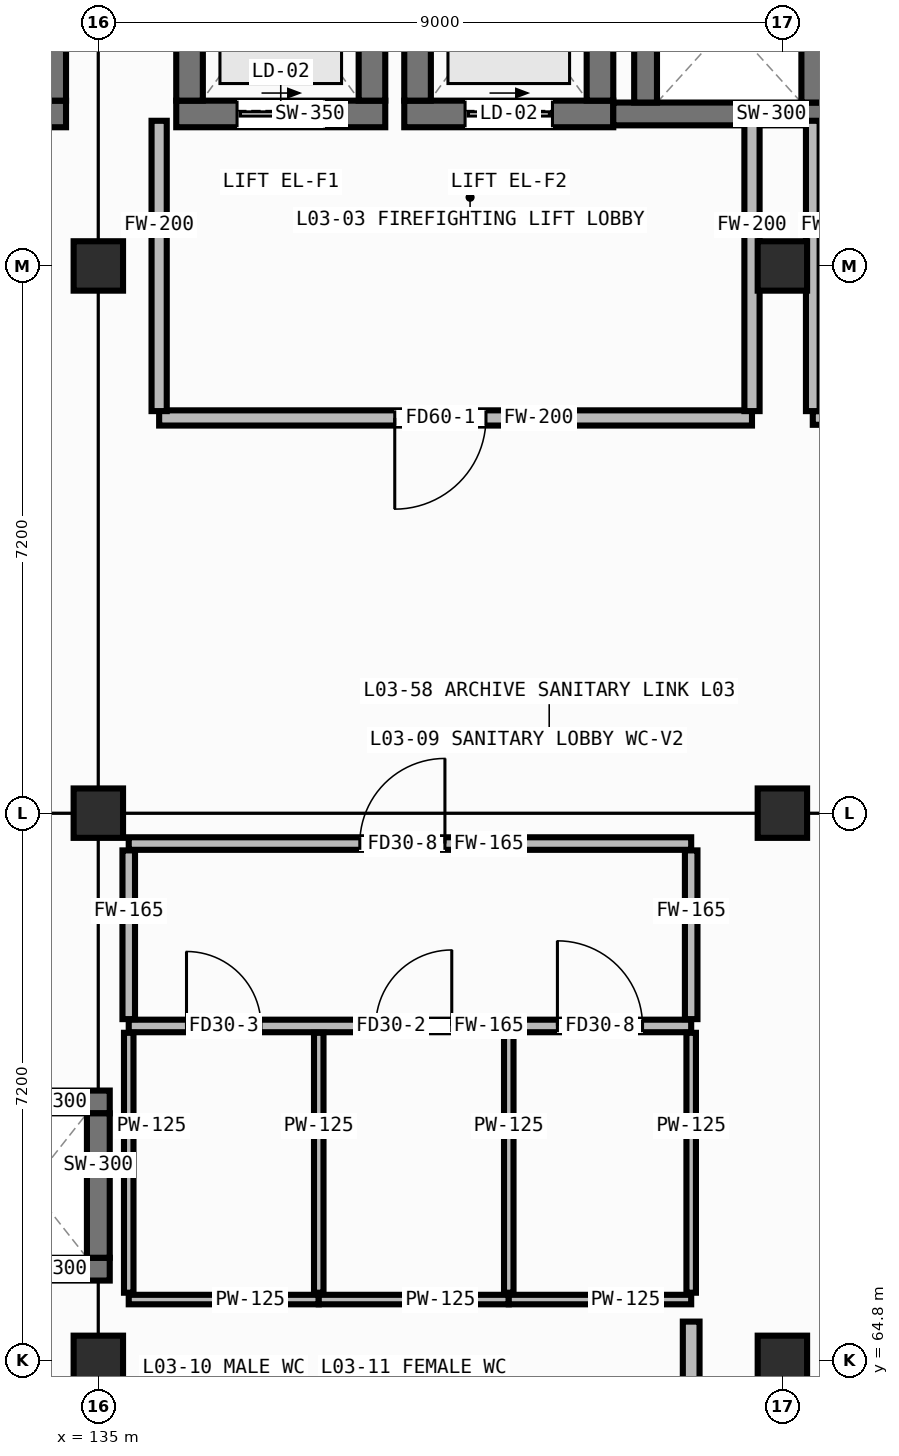
"""IFC4 building model, lengths in metres.
Left out: names, types, materials, properties, quantities, classifications, styles, units other than length and angle.
Written with IfcOpenShell. Run it as: python <this file> out.ifc"""

import sys

from ifc_helpers import new_model, si_unit, direction, frame, frame_2d, origin, origin_2d, place, context, subcontext, project, spatial, rectangle, hollow_rectangle, extrude, element, fill, save


model = new_model("IFC4")
c1 = context("Model", 3, precision=1e-05, world=origin(), true_north=direction((0.0, 1.0)))
c2 = subcontext(c1, "Body", "Model", "MODEL_VIEW")
j1 = project(units=[si_unit("LENGTHUNIT", "METRE"), si_unit("PLANEANGLEUNIT", "RADIAN")], contexts=[c1])
p1 = place(None, origin())
s1 = spatial("IfcSite", under=j1, at=p1, CompositionType="ELEMENT")
p2 = place(p1, origin())
s2 = spatial("IfcBuilding", under=s1, at=p2, CompositionType="ELEMENT")
p3 = place(p2, frame((0.0, 0.0, 8.8)))
s3 = spatial("IfcBuildingStorey", under=s2, at=p3, CompositionType="ELEMENT", Elevation=8.8)
for number, where, z_axis, x_axis in (
    (1, (135.0, 64.8, 0.0), (0.0, 0.0, 1.0), (1.0, 0.0, 0.0)),
    (2, (135.0, 72.0, 0.0), (0.0, 0.0, 1.0), (1.0, 0.0, 0.0)),
    (3, (135.0, 79.2, 0.0), (0.0, 0.0, 1.0), (1.0, 0.0, 0.0)),
    (4, (144.0, 64.8, 0.0), (0.0, 0.0, 1.0), (1.0, 0.0, 0.0)),
    (5, (144.0, 72.0, 0.0), (0.0, 0.0, 1.0), (1.0, 0.0, 0.0)),
    (6, (144.0, 79.2, 0.0), (0.0, 0.0, 1.0), (1.0, 0.0, 0.0)),
):
    element("IfcColumn", number, at=place(p3, frame(where, z_axis=z_axis, x_axis=x_axis)), inside=s3, PredefinedType="COLUMN", context=c2, shape_type="SweptSolid", body=[
        extrude(hollow_rectangle(XDim=0.65, YDim=0.65, WallThickness=0.025, at=origin_2d()), origin(), (0.0, 0.0, 1.0), 4.0),
    ])
p4 = place(p3, frame((126.425, 81.2, 0.0), z_axis=(0.0, 0.0, 1.0), x_axis=(1.0, 0.0, 0.0)))
e7 = element("IfcWall", 7, at=p4, inside=s3, PredefinedType="SHEAR", context=c2, shape_type="SweptSolid", body=[
    extrude(rectangle(XDim=8.15, YDim=0.35, at=frame_2d((4.075, 0.0))), origin(), (0.0, 0.0, 1.0), 3.745),
])
p5 = place(p4, frame((0.525, 0.0, 0.0)))
e8 = element("IfcOpeningElement", 8, at=p5, cuts=e7, PredefinedType="OPENING", context=c2, shape_type="SweptSolid", body=[
    extrude(rectangle(XDim=1.15, YDim=2.1, at=frame_2d((0.575, 1.05))), frame((0.0, 0.187, 0.0), z_axis=(0.0, -1.0, 0.0), x_axis=(1.0, 0.0, 0.0)), (0.0, 0.0, 1.0), 0.374),
])
p6 = place(p3, frame((134.4, 81.375, 0.0), z_axis=(0.0, 0.0, 1.0), x_axis=(0.0, 1.0, 0.0)))
e9 = element("IfcWall", 9, at=p6, inside=s3, PredefinedType="SHEAR", context=c2, shape_type="SweptSolid", body=[
    extrude(rectangle(XDim=3.55, YDim=0.35, at=frame_2d((1.775, 0.0))), origin(), (0.0, 0.0, 1.0), 3.745),
])
p7 = place(p3, frame((136.025, 81.2, 0.0), z_axis=(0.0, 0.0, 1.0), x_axis=(1.0, 0.0, 0.0)))
e10 = element("IfcWall", 10, at=p7, inside=s3, PredefinedType="SHEAR", context=c2, shape_type="SweptSolid", body=[
    extrude(rectangle(XDim=2.75, YDim=0.35, at=frame_2d((1.375, 0.0))), origin(), (0.0, 0.0, 1.0), 3.745),
])
p8 = place(p7, frame((0.8, 0.0, 0.0)))
e11 = element("IfcOpeningElement", 11, at=p8, cuts=e10, PredefinedType="OPENING", context=c2, shape_type="SweptSolid", body=[
    extrude(rectangle(XDim=1.15, YDim=2.12, at=frame_2d((0.575, 1.06))), frame((0.0, 0.187, 0.0), z_axis=(0.0, -1.0, 0.0), x_axis=(1.0, 0.0, 0.0)), (0.0, 0.0, 1.0), 0.374),
])
for number, where, z_axis, x_axis in (
    (12, (136.2, 81.375, 0.0), (0.0, 0.0, 1.0), (0.0, 1.0, 0.0)),
    (13, (138.6, 81.375, 0.0), (0.0, 0.0, 1.0), (0.0, 1.0, 0.0)),
):
    element("IfcWall", number, at=place(p3, frame(where, z_axis=z_axis, x_axis=x_axis)), inside=s3, PredefinedType="SHEAR", context=c2, shape_type="SweptSolid", body=[
        extrude(rectangle(XDim=2.85, YDim=0.35, at=frame_2d((1.425, 0.0))), origin(), (0.0, 0.0, 1.0), 3.745),
    ])
p9 = place(p3, frame((139.025, 81.2, 0.0), z_axis=(0.0, 0.0, 1.0), x_axis=(1.0, 0.0, 0.0)))
e14 = element("IfcWall", 14, at=p9, inside=s3, PredefinedType="SHEAR", context=c2, shape_type="SweptSolid", body=[
    extrude(rectangle(XDim=2.75, YDim=0.35, at=frame_2d((1.375, 0.0))), origin(), (0.0, 0.0, 1.0), 3.745),
])
p10 = place(p9, frame((0.8, 0.0, 0.0)))
e15 = element("IfcOpeningElement", 15, at=p10, cuts=e14, PredefinedType="OPENING", context=c2, shape_type="SweptSolid", body=[
    extrude(rectangle(XDim=1.15, YDim=2.12, at=frame_2d((0.575, 1.06))), frame((0.0, 0.187, 0.0), z_axis=(0.0, -1.0, 0.0), x_axis=(1.0, 0.0, 0.0)), (0.0, 0.0, 1.0), 0.374),
])
for number, where, z_axis, x_axis in (
    (16, (139.2, 81.375, 0.0), (0.0, 0.0, 1.0), (0.0, 1.0, 0.0)),
    (17, (141.6, 81.375, 0.0), (0.0, 0.0, 1.0), (0.0, 1.0, 0.0)),
):
    element("IfcWall", number, at=place(p3, frame(where, z_axis=z_axis, x_axis=x_axis)), inside=s3, PredefinedType="SHEAR", context=c2, shape_type="SweptSolid", body=[
        extrude(rectangle(XDim=2.85, YDim=0.35, at=frame_2d((1.425, 0.0))), origin(), (0.0, 0.0, 1.0), 3.745),
    ])
p11 = place(p3, frame((141.775, 81.2, 0.0), z_axis=(0.0, 0.0, 1.0), x_axis=(1.0, 0.0, 0.0)))
e18 = element("IfcWall", 18, at=p11, inside=s3, PredefinedType="SHEAR", context=c2, shape_type="SweptSolid", body=[
    extrude(rectangle(XDim=3.25, YDim=0.3, at=frame_2d((1.625, 0.0))), origin(), (0.0, 0.0, 1.0), 3.745),
])
for number, where, z_axis, x_axis in (
    (19, (142.2, 81.35, 0.0), (0.0, 0.0, 1.0), (0.0, 1.0, 0.0)),
    (20, (144.4, 81.35, 0.0), (0.0, 0.0, 1.0), (0.0, 1.0, 0.0)),
    (21, (133.05, 66.0, 0.0), (0.0, 0.0, 1.0), (1.0, 0.0, 0.0)),
    (22, (133.05, 68.2, 0.0), (0.0, 0.0, 1.0), (1.0, 0.0, 0.0)),
):
    element("IfcWall", number, at=place(p3, frame(where, z_axis=z_axis, x_axis=x_axis)), inside=s3, PredefinedType="SHEAR", context=c2, shape_type="SweptSolid", body=[
        extrude(rectangle(XDim=2.1, YDim=0.3, at=frame_2d((1.05, 0.0))), origin(), (0.0, 0.0, 1.0), 3.745),
    ])
p12 = place(p3, frame((135.0, 66.15, 0.0), z_axis=(0.0, 0.0, 1.0), x_axis=(0.0, 1.0, 0.0)))
e23 = element("IfcWall", 23, at=p12, inside=s3, PredefinedType="SHEAR", context=c2, shape_type="SweptSolid", body=[
    extrude(rectangle(XDim=1.9, YDim=0.3, at=frame_2d((0.95, 0.0))), origin(), (0.0, 0.0, 1.0), 3.745),
])
p13 = place(p3, frame((135.8, 77.2, 0.0), z_axis=(0.0, 0.0, 1.0), x_axis=(1.0, 0.0, 0.0)))
e24 = element("IfcWall", 24, at=p13, inside=s3, PredefinedType="PARTITIONING", context=c2, shape_type="SweptSolid", body=[
    extrude(rectangle(XDim=7.8, YDim=0.2, at=frame_2d((3.9, 0.0))), origin(), (0.0, 0.0, 1.0), 3.745),
])
p14 = place(p13, frame((3.1, 0.0, 0.0)))
e25 = element("IfcOpeningElement", 25, at=p14, cuts=e24, PredefinedType="OPENING", context=c2, shape_type="SweptSolid", body=[
    extrude(rectangle(XDim=1.2, YDim=2.1, at=frame_2d((0.6, 1.05))), frame((0.0, 0.112, 0.0), z_axis=(0.0, -1.0, 0.0), x_axis=(1.0, 0.0, 0.0)), (0.0, 0.0, 1.0), 0.224),
])
for number, where, z_axis, x_axis in (
    (26, (135.8, 77.29, 0.0), (0.0, 0.0, 1.0), (0.0, 1.0, 0.0)),
    (27, (143.6, 77.29, 0.0), (0.0, 0.0, 1.0), (0.0, 1.0, 0.0)),
):
    element("IfcWall", number, at=place(p3, frame(where, z_axis=z_axis, x_axis=x_axis)), inside=s3, PredefinedType="PARTITIONING", context=c2, shape_type="SweptSolid", body=[
        extrude(rectangle(XDim=3.82, YDim=0.2, at=frame_2d((1.91, 0.0))), origin(), (0.0, 0.0, 1.0), 3.745),
    ])
p15 = place(p3, frame((144.4, 77.2, 0.0), z_axis=(0.0, 0.0, 1.0), x_axis=(1.0, 0.0, 0.0)))
e28 = element("IfcWall", 28, at=p15, inside=s3, PredefinedType="PARTITIONING", context=c2, shape_type="SweptSolid", body=[
    extrude(rectangle(XDim=8.2, YDim=0.18, at=frame_2d((4.1, 0.0))), origin(), (0.0, 0.0, 1.0), 3.745),
])
p16 = place(p15, frame((3.54, 0.0, 0.0)))
e29 = element("IfcOpeningElement", 29, at=p16, cuts=e28, PredefinedType="OPENING", context=c2, shape_type="SweptSolid", body=[
    extrude(rectangle(XDim=1.12, YDim=2.08, at=frame_2d((0.56, 1.04))), frame((0.0, 0.102, 0.0), z_axis=(0.0, -1.0, 0.0), x_axis=(1.0, 0.0, 0.0)), (0.0, 0.0, 1.0), 0.204),
])
p17 = place(p3, frame((144.4, 77.29, 0.0), z_axis=(0.0, 0.0, 1.0), x_axis=(0.0, 1.0, 0.0)))
e30 = element("IfcWall", 30, at=p17, inside=s3, PredefinedType="PARTITIONING", context=c2, shape_type="SweptSolid", body=[
    extrude(rectangle(XDim=3.82, YDim=0.18, at=frame_2d((1.91, 0.0))), origin(), (0.0, 0.0, 1.0), 3.745),
])
p18 = place(p3, frame((135.4, 69.2, 0.0), z_axis=(0.0, 0.0, 1.0), x_axis=(1.0, 0.0, 0.0)))
e31 = element("IfcWall", 31, at=p18, inside=s3, PredefinedType="PARTITIONING", context=c2, shape_type="SweptSolid", body=[
    extrude(rectangle(XDim=7.4, YDim=0.165, at=frame_2d((3.7, 0.0))), origin(), (0.0, 0.0, 1.0), 3.745),
])
p19 = place(p18, frame((0.76, 0.0, 0.0)))
e32 = element("IfcOpeningElement", 32, at=p19, cuts=e31, PredefinedType="OPENING", context=c2, shape_type="SweptSolid", body=[
    extrude(rectangle(XDim=0.98, YDim=2.02, at=frame_2d((0.49, 1.01))), frame((0.0, 0.094, 0.0), z_axis=(0.0, -1.0, 0.0), x_axis=(1.0, 0.0, 0.0)), (0.0, 0.0, 1.0), 0.189),
])
p20 = place(p18, frame((3.25, 0.0, 0.0)))
e33 = element("IfcOpeningElement", 33, at=p20, cuts=e31, PredefinedType="OPENING", context=c2, shape_type="SweptSolid", body=[
    extrude(rectangle(XDim=1.0, YDim=2.08, at=frame_2d((0.5, 1.04))), frame((0.0, 0.094, 0.0), z_axis=(0.0, -1.0, 0.0), x_axis=(1.0, 0.0, 0.0)), (0.0, 0.0, 1.0), 0.189),
])
p21 = place(p18, frame((5.64, 0.0, 0.0)))
e34 = element("IfcOpeningElement", 34, at=p21, cuts=e31, PredefinedType="OPENING", context=c2, shape_type="SweptSolid", body=[
    extrude(rectangle(XDim=1.12, YDim=2.08, at=frame_2d((0.56, 1.04))), frame((0.0, 0.094, 0.0), z_axis=(0.0, -1.0, 0.0), x_axis=(1.0, 0.0, 0.0)), (0.0, 0.0, 1.0), 0.189),
])
p22 = place(p3, frame((135.4, 71.6, 0.0), z_axis=(0.0, 0.0, 1.0), x_axis=(1.0, 0.0, 0.0)))
e35 = element("IfcWall", 35, at=p22, inside=s3, PredefinedType="PARTITIONING", context=c2, shape_type="SweptSolid", body=[
    extrude(rectangle(XDim=7.4, YDim=0.165, at=frame_2d((3.7, 0.0))), origin(), (0.0, 0.0, 1.0), 3.745),
])
p23 = place(p22, frame((3.04, 0.0, 0.0)))
e36 = element("IfcOpeningElement", 36, at=p23, cuts=e35, PredefinedType="OPENING", context=c2, shape_type="SweptSolid", body=[
    extrude(rectangle(XDim=1.12, YDim=2.08, at=frame_2d((0.56, 1.04))), frame((0.0, 0.094, 0.0), z_axis=(0.0, -1.0, 0.0), x_axis=(1.0, 0.0, 0.0)), (0.0, 0.0, 1.0), 0.189),
])
for number, where, z_axis, x_axis in (
    (37, (135.4, 69.29, 0.0), (0.0, 0.0, 1.0), (0.0, 1.0, 0.0)),
    (38, (142.8, 69.29, 0.0), (0.0, 0.0, 1.0), (0.0, 1.0, 0.0)),
):
    element("IfcWall", number, at=place(p3, frame(where, z_axis=z_axis, x_axis=x_axis)), inside=s3, PredefinedType="PARTITIONING", context=c2, shape_type="SweptSolid", body=[
        extrude(rectangle(XDim=2.22, YDim=0.165, at=frame_2d((1.11, 0.0))), origin(), (0.0, 0.0, 1.0), 3.745),
    ])
p24 = place(p3, frame((135.4, 65.6, 0.0), z_axis=(0.0, 0.0, 1.0), x_axis=(1.0, 0.0, 0.0)))
e39 = element("IfcWall", 39, at=p24, inside=s3, PredefinedType="PARTITIONING", context=c2, shape_type="SweptSolid", body=[
    extrude(rectangle(XDim=2.5, YDim=0.125, at=frame_2d((1.25, 0.0))), origin(), (0.0, 0.0, 1.0), 3.745),
])
for number, where, z_axis, x_axis in (
    (40, (135.4, 65.69, 0.0), (0.0, 0.0, 1.0), (0.0, 1.0, 0.0)),
    (41, (137.9, 65.69, 0.0), (0.0, 0.0, 1.0), (0.0, 1.0, 0.0)),
):
    element("IfcWall", number, at=place(p3, frame(where, z_axis=z_axis, x_axis=x_axis)), inside=s3, PredefinedType="PARTITIONING", context=c2, shape_type="SweptSolid", body=[
        extrude(rectangle(XDim=3.42, YDim=0.125, at=frame_2d((1.71, 0.0))), origin(), (0.0, 0.0, 1.0), 3.745),
    ])
p25 = place(p3, frame((137.9, 65.6, 0.0), z_axis=(0.0, 0.0, 1.0), x_axis=(1.0, 0.0, 0.0)))
e42 = element("IfcWall", 42, at=p25, inside=s3, PredefinedType="PARTITIONING", context=c2, shape_type="SweptSolid", body=[
    extrude(rectangle(XDim=2.5, YDim=0.125, at=frame_2d((1.25, 0.0))), origin(), (0.0, 0.0, 1.0), 3.745),
])
p26 = place(p3, frame((140.4, 65.69, 0.0), z_axis=(0.0, 0.0, 1.0), x_axis=(0.0, 1.0, 0.0)))
e43 = element("IfcWall", 43, at=p26, inside=s3, PredefinedType="PARTITIONING", context=c2, shape_type="SweptSolid", body=[
    extrude(rectangle(XDim=3.42, YDim=0.125, at=frame_2d((1.71, 0.0))), origin(), (0.0, 0.0, 1.0), 3.745),
])
p27 = place(p3, frame((140.4, 65.6, 0.0), z_axis=(0.0, 0.0, 1.0), x_axis=(1.0, 0.0, 0.0)))
e44 = element("IfcWall", 44, at=p27, inside=s3, PredefinedType="PARTITIONING", context=c2, shape_type="SweptSolid", body=[
    extrude(rectangle(XDim=2.4, YDim=0.125, at=frame_2d((1.2, 0.0))), origin(), (0.0, 0.0, 1.0), 3.745),
])
p28 = place(p3, frame((142.8, 65.69, 0.0), z_axis=(0.0, 0.0, 1.0), x_axis=(0.0, 1.0, 0.0)))
e45 = element("IfcWall", 45, at=p28, inside=s3, PredefinedType="PARTITIONING", context=c2, shape_type="SweptSolid", body=[
    extrude(rectangle(XDim=3.42, YDim=0.125, at=frame_2d((1.71, 0.0))), origin(), (0.0, 0.0, 1.0), 3.745),
])
p29 = place(p3, frame((142.8, 54.49, 0.0), z_axis=(0.0, 0.0, 1.0), x_axis=(0.0, 1.0, 0.0)))
e46 = element("IfcWall", 46, at=p29, inside=s3, PredefinedType="PARTITIONING", context=c2, shape_type="SweptSolid", body=[
    extrude(rectangle(XDim=10.82, YDim=0.22, at=frame_2d((5.41, 0.0))), origin(), (0.0, 0.0, 1.0), 3.745),
])
p30 = place(p29, frame((6.035, 0.0, 0.0)))
e47 = element("IfcOpeningElement", 47, at=p30, cuts=e46, PredefinedType="OPENING", context=c2, shape_type="SweptSolid", body=[
    extrude(rectangle(XDim=1.35, YDim=2.08, at=frame_2d((0.675, 1.04))), frame((0.0, 0.122, 0.0), z_axis=(0.0, -1.0, 0.0), x_axis=(1.0, 0.0, 0.0)), (0.0, 0.0, 1.0), 0.244),
])
p31 = place(p8, origin())
e48 = element("IfcDoor", 48, at=p31, inside=s3, OperationType="SLIDING_TO_LEFT", PredefinedType="DOOR", context=c2, shape_type="SweptSolid", body=[
    extrude(rectangle(XDim=1.15, YDim=2.12, at=frame_2d((0.575, 1.06))), frame((0.0, 0.025, 0.0), z_axis=(0.0, -1.0, 0.0), x_axis=(1.0, 0.0, 0.0)), (0.0, 0.0, 1.0), 0.05),
])
fill(e11, e48)
p32 = place(p10, origin())
e49 = element("IfcDoor", 49, at=p32, inside=s3, OperationType="SLIDING_TO_LEFT", PredefinedType="DOOR", context=c2, shape_type="SweptSolid", body=[
    extrude(rectangle(XDim=1.15, YDim=2.12, at=frame_2d((0.575, 1.06))), frame((0.0, 0.025, 0.0), z_axis=(0.0, -1.0, 0.0), x_axis=(1.0, 0.0, 0.0)), (0.0, 0.0, 1.0), 0.05),
])
fill(e15, e49)
p33 = place(p14, frame((1.2, 0.0, 0.0), z_axis=(0.0, 0.0, 1.0), x_axis=(-1.0, 0.0, 0.0)))
e50 = element("IfcDoor", 50, at=p33, inside=s3, OperationType="SINGLE_SWING_RIGHT", PredefinedType="DOOR", context=c2, shape_type="SweptSolid", body=[
    extrude(rectangle(XDim=1.2, YDim=2.1, at=frame_2d((0.6, 1.05))), frame((0.0, 0.025, 0.0), z_axis=(0.0, -1.0, 0.0), x_axis=(1.0, 0.0, 0.0)), (0.0, 0.0, 1.0), 0.05),
])
fill(e25, e50)
p34 = place(p23, origin())
e51 = element("IfcDoor", 51, at=p34, inside=s3, OperationType="SINGLE_SWING_RIGHT", PredefinedType="DOOR", context=c2, shape_type="SweptSolid", body=[
    extrude(rectangle(XDim=1.12, YDim=2.08, at=frame_2d((0.56, 1.04))), frame((0.0, 0.025, 0.0), z_axis=(0.0, -1.0, 0.0), x_axis=(1.0, 0.0, 0.0)), (0.0, 0.0, 1.0), 0.05),
])
fill(e36, e51)
p35 = place(p19, origin())
e52 = element("IfcDoor", 52, at=p35, inside=s3, OperationType="SINGLE_SWING_LEFT", PredefinedType="DOOR", context=c2, shape_type="SweptSolid", body=[
    extrude(rectangle(XDim=0.98, YDim=2.02, at=frame_2d((0.49, 1.01))), frame((0.0, 0.025, 0.0), z_axis=(0.0, -1.0, 0.0), x_axis=(1.0, 0.0, 0.0)), (0.0, 0.0, 1.0), 0.05),
])
fill(e32, e52)
p36 = place(p20, origin())
e53 = element("IfcDoor", 53, at=p36, inside=s3, OperationType="SINGLE_SWING_RIGHT", PredefinedType="DOOR", context=c2, shape_type="SweptSolid", body=[
    extrude(rectangle(XDim=1.0, YDim=2.08, at=frame_2d((0.5, 1.04))), frame((0.0, 0.025, 0.0), z_axis=(0.0, -1.0, 0.0), x_axis=(1.0, 0.0, 0.0)), (0.0, 0.0, 1.0), 0.05),
])
fill(e33, e53)
p37 = place(p21, origin())
e54 = element("IfcDoor", 54, at=p37, inside=s3, OperationType="SINGLE_SWING_LEFT", PredefinedType="DOOR", context=c2, shape_type="SweptSolid", body=[
    extrude(rectangle(XDim=1.12, YDim=2.08, at=frame_2d((0.56, 1.04))), frame((0.0, 0.025, 0.0), z_axis=(0.0, -1.0, 0.0), x_axis=(1.0, 0.0, 0.0)), (0.0, 0.0, 1.0), 0.05),
])
fill(e34, e54)
save(model, sys.argv[1])
